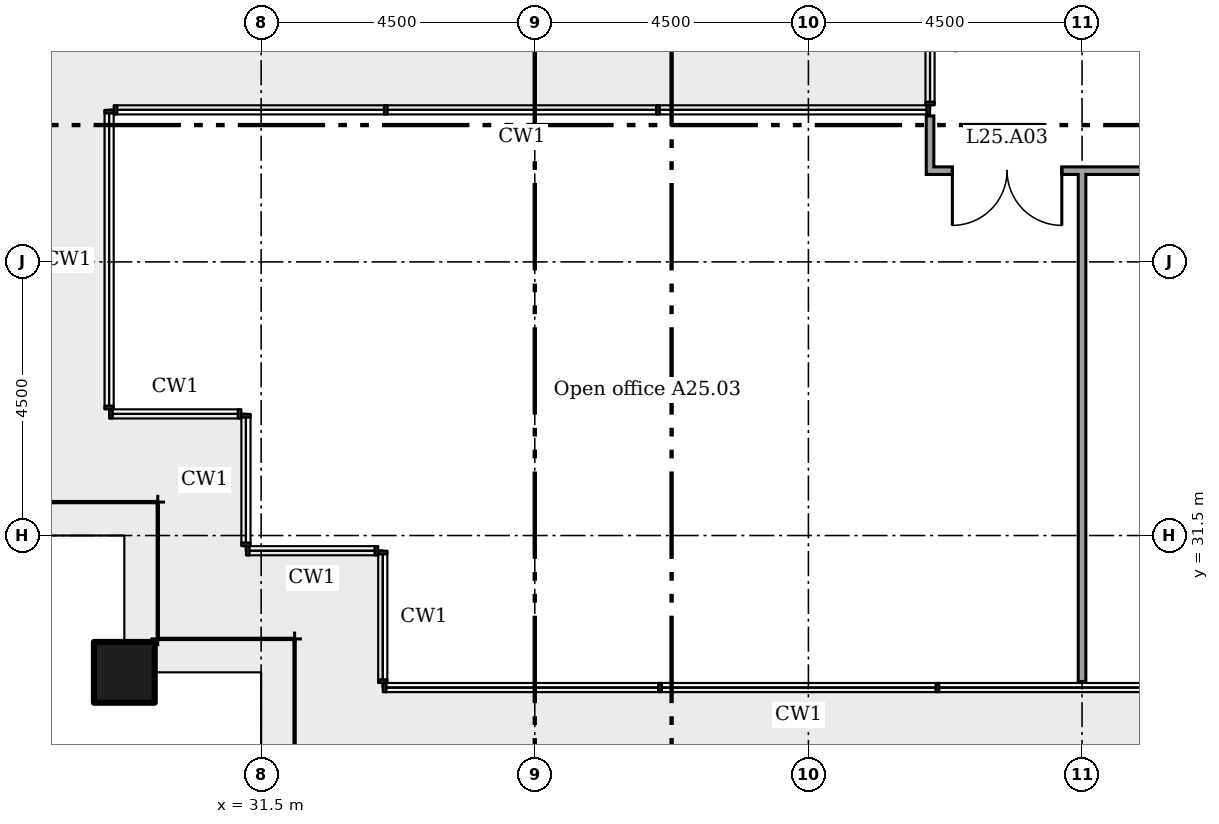
"""IFC4 building model, lengths in metres.
Left out: names, types, materials, properties, quantities, classifications, styles, units other than length and angle.
Written with IfcOpenShell. Run it as: python <this file> out.ifc"""

import sys

from ifc_helpers import new_model, si_unit, direction, frame, frame_2d, origin, origin_2d, place, context, subcontext, project, spatial, rectangle, extrude, element, fill, save


model = new_model("IFC4")
c1 = context("Model", 3, precision=1e-05, world=origin(), true_north=direction((0.0, 1.0)))
c2 = subcontext(c1, "Body", "Model", "MODEL_VIEW")
j1 = project(units=[si_unit("LENGTHUNIT", "METRE"), si_unit("PLANEANGLEUNIT", "RADIAN")], contexts=[c1])
p1 = place(None, origin())
s1 = spatial("IfcSite", under=j1, at=p1, CompositionType="ELEMENT")
p2 = place(p1, origin())
s2 = spatial("IfcBuilding", under=s1, at=p2, CompositionType="ELEMENT")
p3 = place(p2, frame((0.0, 0.0, 102.8)))
s3 = spatial("IfcBuildingStorey", under=s2, at=p3, CompositionType="ELEMENT", Elevation=102.8)
p4 = place(p3, frame((29.25, 29.25, 0.0)))
e1 = element("IfcColumn", 1, at=p4, inside=s3, PredefinedType="COLUMN", context=c2, shape_type="SweptSolid", body=[
    extrude(rectangle(XDim=1.0, YDim=1.0, at=origin_2d()), origin(), (0.0, 0.0, 1.0), 3.6),
])
p5 = place(p3, frame((42.438, 37.5, 0.0)))
e2 = element("IfcWall", 2, at=p5, inside=s3, PredefinedType="PARTITIONING", context=c2, shape_type="SweptSolid", body=[
    extrude(rectangle(XDim=18.525, YDim=0.125, at=frame_2d((9.262, 0.0))), origin(), (0.0, 0.0, 1.0), 3.45),
])
p6 = place(p5, frame((6.562, 0.0, 0.0)))
e3 = element("IfcOpeningElement", 3, at=p6, cuts=e2, PredefinedType="OPENING", context=c2, shape_type="SweptSolid", body=[
    extrude(rectangle(XDim=1.0, YDim=2.1, at=frame_2d((0.5, 1.05))), frame((0.0, 0.073, 0.0), z_axis=(0.0, -1.0, 0.0), x_axis=(1.0, 0.0, 0.0)), (0.0, 0.0, 1.0), 0.145),
])
p7 = place(p5, frame((12.857, 0.0, 0.0)))
e4 = element("IfcOpeningElement", 4, at=p7, cuts=e2, PredefinedType="OPENING", context=c2, shape_type="SweptSolid", body=[
    extrude(rectangle(XDim=1.0, YDim=2.1, at=frame_2d((0.5, 1.05))), frame((0.0, 0.073, 0.0), z_axis=(0.0, -1.0, 0.0), x_axis=(1.0, 0.0, 0.0)), (0.0, 0.0, 1.0), 0.145),
])
p8 = place(p5, frame((0.429, 0.0, 0.0)))
e5 = element("IfcOpeningElement", 5, at=p8, cuts=e2, PredefinedType="OPENING", context=c2, shape_type="SweptSolid", body=[
    extrude(rectangle(XDim=1.8, YDim=2.1, at=frame_2d((0.9, 1.05))), frame((0.0, 0.073, 0.0), z_axis=(0.0, -1.0, 0.0), x_axis=(1.0, 0.0, 0.0)), (0.0, 0.0, 1.0), 0.145),
])
p9 = place(p3, frame((42.5, 37.562, 0.0), z_axis=(0.0, 0.0, 1.0), x_axis=(0.0, 1.0, 0.0)))
e6 = element("IfcWall", 6, at=p9, inside=s3, PredefinedType="PARTITIONING", context=c2, shape_type="SweptSolid", body=[
    extrude(rectangle(XDim=0.837, YDim=0.125, at=frame_2d((0.419, 0.0))), origin(), (0.0, 0.0, 1.0), 3.45),
])
p10 = place(p3, frame((45.0, 29.1, 0.0), z_axis=(0.0, 0.0, 1.0), x_axis=(0.0, 1.0, 0.0)))
e7 = element("IfcWall", 7, at=p10, inside=s3, PredefinedType="PARTITIONING", context=c2, shape_type="SweptSolid", body=[
    extrude(rectangle(XDim=8.4, YDim=0.125, at=frame_2d((4.2, 0.0))), origin(), (0.0, 0.0, 1.0), 2.766),
])
p11 = place(p8, frame((1.8, 0.0, 0.0), x_axis=(-1.0, 0.0, 0.0)))
e8 = element("IfcDoor", 8, at=p11, inside=s3, OperationType="DOUBLE_DOOR_SINGLE_SWING", PredefinedType="DOOR", context=c2, shape_type="SweptSolid", body=[
    extrude(rectangle(XDim=1.8, YDim=2.1, at=frame_2d((0.9, 1.05))), frame((0.0, 0.025, 0.0), z_axis=(0.0, -1.0, 0.0), x_axis=(1.0, 0.0, 0.0)), (0.0, 0.0, 1.0), 0.05),
])
fill(e5, e8)
save(model, sys.argv[1])
